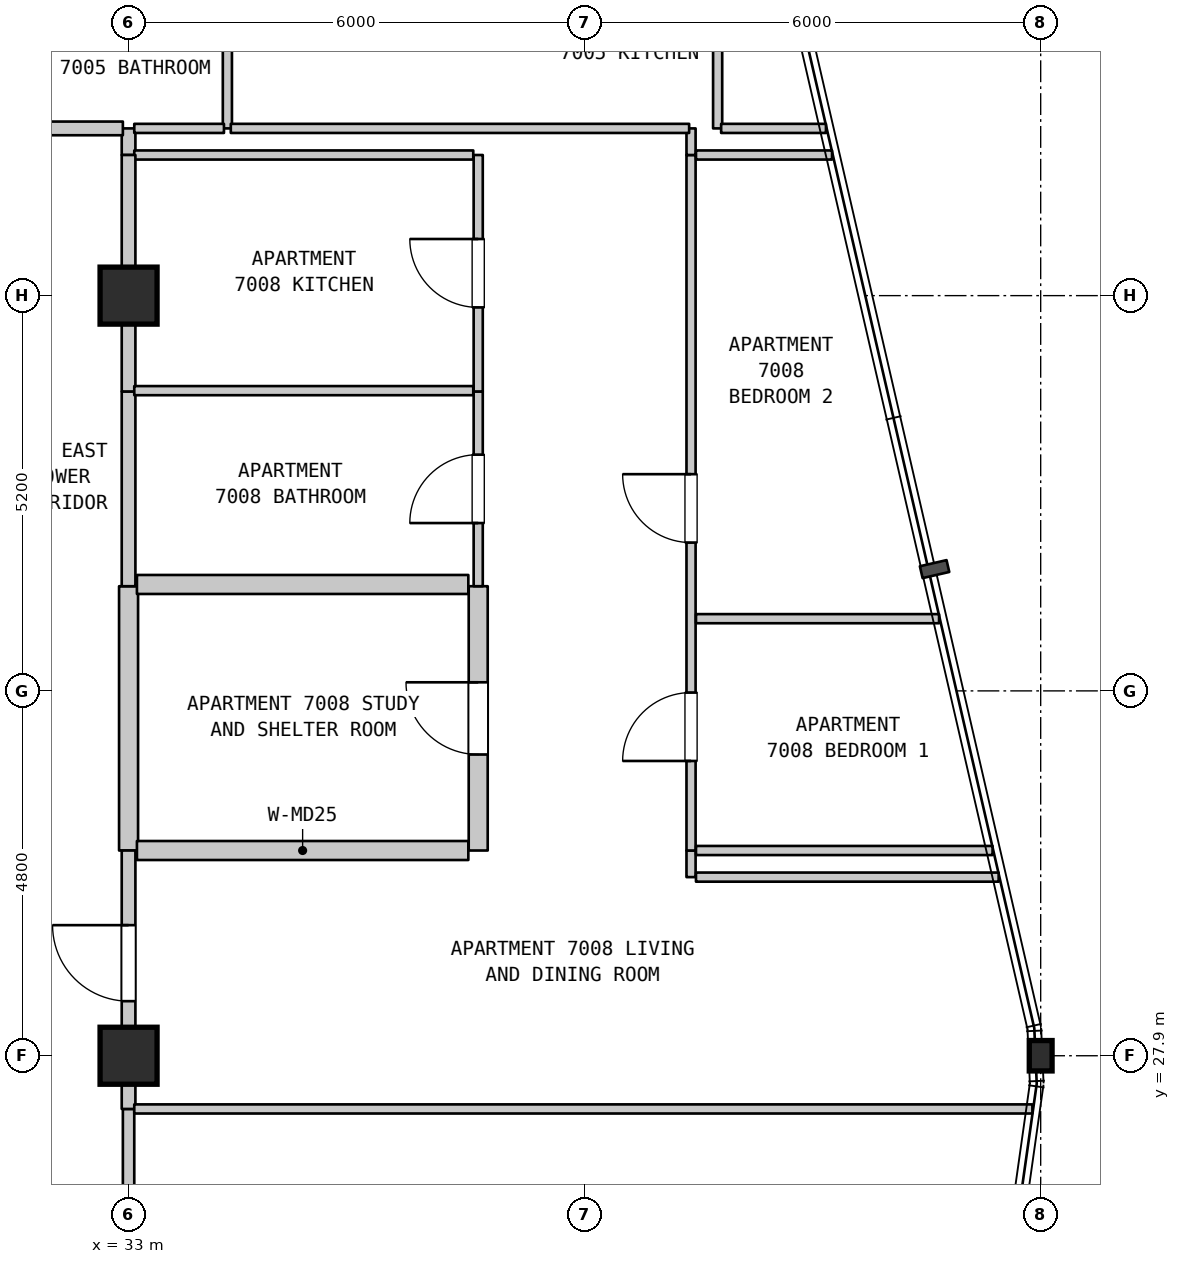
"""IFC4 building model, lengths in metres.
Left out: names, types, materials, properties, quantities, classifications, styles, units other than length and angle.
Written with IfcOpenShell. Run it as: python <this file> out.ifc"""

import sys

from ifc_helpers import new_model, si_unit, direction, frame, frame_2d, origin, origin_2d, place, context, subcontext, project, spatial, rectangle, i_section, extrude, element, fill, save


model = new_model("IFC4")
c1 = context("Model", 3, precision=1e-05, world=origin(), true_north=direction((0.0, 1.0)))
c2 = subcontext(c1, "Body", "Model", "MODEL_VIEW")
j1 = project(units=[si_unit("LENGTHUNIT", "METRE"), si_unit("PLANEANGLEUNIT", "RADIAN")], contexts=[c1])
p1 = place(None, origin())
s1 = spatial("IfcSite", under=j1, at=p1, CompositionType="ELEMENT")
p2 = place(p1, origin())
s2 = spatial("IfcBuilding", under=s1, at=p2, CompositionType="ELEMENT")
p3 = place(p2, frame((0.0, 0.0, 280.6)))
s3 = spatial("IfcBuildingStorey", under=s2, at=p3, CompositionType="ELEMENT", Elevation=280.6)
for number, where, z_axis, x_axis in (
    (1, (33.0, 27.9, 0.0), (0.0, 0.0, 1.0), (1.0, 0.0, 0.0)),
    (2, (33.0, 37.9, 0.0), (0.0, 0.0, 1.0), (1.0, 0.0, 0.0)),
):
    element("IfcColumn", number, at=place(p3, frame(where, z_axis=z_axis, x_axis=x_axis)), inside=s3, PredefinedType="COLUMN", context=c2, shape_type="SweptSolid", body=[
        extrude(rectangle(XDim=0.75, YDim=0.75, at=origin_2d()), origin(), (0.0, 0.0, 1.0), 3.7),
    ])
p4 = place(p3, frame((45.0, 27.9, 0.0), z_axis=(0.0, 0.0, 1.0), x_axis=(1.0, 0.0, 0.0)))
e3 = element("IfcColumn", 3, at=p4, inside=s3, PredefinedType="COLUMN", context=c2, shape_type="SweptSolid", body=[
    extrude(i_section(OverallWidth=0.3, OverallDepth=0.4, WebThickness=0.013, FlangeThickness=0.024, FilletRadius=0.027, at=origin_2d()), origin(), (0.0, 0.0, 1.0), 3.7),
])
p5 = place(p3, frame((33.0, 19.5, 0.0), z_axis=(0.0, 0.0, 1.0), x_axis=(0.0, 1.0, 0.0)))
e4 = element("IfcWall", 4, at=p5, inside=s3, PredefinedType="STANDARD", context=c2, shape_type="SweptSolid", body=[
    extrude(rectangle(XDim=7.7, YDim=0.15, at=frame_2d((3.85, 0.0))), origin(), (0.0, 0.0, 1.0), 3.1),
])
p6 = place(p5, frame((3.913, 0.0, 0.0)))
e5 = element("IfcOpeningElement", 5, at=p6, cuts=e4, PredefinedType="OPENING", context=c2, shape_type="SweptSolid", body=[
    extrude(rectangle(XDim=1.0, YDim=2.15, at=frame_2d((0.5, 1.075))), frame((0.0, 0.085, 0.0), z_axis=(0.0, -1.0, 0.0), x_axis=(1.0, 0.0, 0.0)), (0.0, 0.0, 1.0), 0.17),
])
p7 = place(p3, frame((33.0, 27.2, 0.0), z_axis=(0.0, 0.0, 1.0), x_axis=(0.0, 1.0, 0.0)))
e6 = element("IfcWall", 6, at=p7, inside=s3, PredefinedType="STANDARD", context=c2, shape_type="SweptSolid", body=[
    extrude(rectangle(XDim=0.7, YDim=0.18, at=frame_2d((0.35, 0.0))), origin(), (0.0, 0.0, 1.0), 3.1),
])
p8 = place(p3, frame((33.0, 30.6, 0.0), z_axis=(0.0, 0.0, 1.0), x_axis=(0.0, 1.0, 0.0)))
e7 = element("IfcWall", 7, at=p8, inside=s3, PredefinedType="STANDARD", context=c2, shape_type="SweptSolid", body=[
    extrude(rectangle(XDim=3.477, YDim=0.25, at=frame_2d((1.738, 0.0))), origin(), (0.0, 0.0, 1.0), 2.89),
])
p9 = place(p3, frame((33.0, 34.077, 0.0), z_axis=(0.0, 0.0, 1.0), x_axis=(0.0, 1.0, 0.0)))
e8 = element("IfcWall", 8, at=p9, inside=s3, PredefinedType="STANDARD", context=c2, shape_type="SweptSolid", body=[
    extrude(rectangle(XDim=2.562, YDim=0.18, at=frame_2d((1.281, 0.0))), origin(), (0.0, 0.0, 1.0), 2.89),
])
p10 = place(p3, frame((33.0, 36.639, 0.0), z_axis=(0.0, 0.0, 1.0), x_axis=(0.0, 1.0, 0.0)))
e9 = element("IfcWall", 9, at=p10, inside=s3, PredefinedType="STANDARD", context=c2, shape_type="SweptSolid", body=[
    extrude(rectangle(XDim=1.261, YDim=0.18, at=frame_2d((0.63, 0.0))), origin(), (0.0, 0.0, 1.0), 2.89),
])
p11 = place(p3, frame((33.0, 39.75, 0.0), z_axis=(0.0, 0.0, 1.0), x_axis=(0.0, 1.0, 0.0)))
e10 = element("IfcWall", 10, at=p11, inside=s3, PredefinedType="STANDARD", context=c2, shape_type="SweptSolid", body=[
    extrude(rectangle(XDim=0.35, YDim=0.18, at=frame_2d((0.175, 0.0))), origin(), (0.0, 0.0, 1.0), 3.39),
])
p12 = place(p3, frame((34.3, 40.1, 0.0), z_axis=(0.0, 0.0, 1.0), x_axis=(0.0, 1.0, 0.0)))
e11 = element("IfcWall", 11, at=p12, inside=s3, PredefinedType="PARTITIONING", context=c2, shape_type="SweptSolid", body=[
    extrude(rectangle(XDim=2.3, YDim=0.12, at=frame_2d((1.15, 0.0))), origin(), (0.0, 0.0, 1.0), 3.39),
])
p13 = place(p3, frame((37.6, 30.6, 0.0), z_axis=(0.0, 0.0, 1.0), x_axis=(0.0, 1.0, 0.0)))
e12 = element("IfcWall", 12, at=p13, inside=s3, PredefinedType="STANDARD", context=c2, shape_type="SweptSolid", body=[
    extrude(rectangle(XDim=3.477, YDim=0.25, at=frame_2d((1.738, 0.0))), origin(), (0.0, 0.0, 1.0), 3.39),
])
p14 = place(p13, frame((1.263, 0.0, 0.0)))
e13 = element("IfcOpeningElement", 13, at=p14, cuts=e12, PredefinedType="OPENING", context=c2, shape_type="SweptSolid", body=[
    extrude(rectangle(XDim=0.95, YDim=2.15, at=frame_2d((0.475, 1.075))), frame((0.0, 0.135, 0.0), z_axis=(0.0, -1.0, 0.0), x_axis=(1.0, 0.0, 0.0)), (0.0, 0.0, 1.0), 0.27),
])
p15 = place(p3, frame((37.6, 34.077, 0.0), z_axis=(0.0, 0.0, 1.0), x_axis=(0.0, 1.0, 0.0)))
e14 = element("IfcWall", 14, at=p15, inside=s3, PredefinedType="PARTITIONING", context=c2, shape_type="SweptSolid", body=[
    extrude(rectangle(XDim=2.562, YDim=0.12, at=frame_2d((1.281, 0.0))), origin(), (0.0, 0.0, 1.0), 3.39),
])
p16 = place(p15, frame((0.831, 0.0, 0.0)))
e15 = element("IfcOpeningElement", 15, at=p16, cuts=e14, PredefinedType="OPENING", context=c2, shape_type="SweptSolid", body=[
    extrude(rectangle(XDim=0.9, YDim=2.1, at=frame_2d((0.45, 1.05))), frame((0.0, 0.07, 0.0), z_axis=(0.0, -1.0, 0.0), x_axis=(1.0, 0.0, 0.0)), (0.0, 0.0, 1.0), 0.14),
])
p17 = place(p3, frame((37.6, 36.639, 0.0), z_axis=(0.0, 0.0, 1.0), x_axis=(0.0, 1.0, 0.0)))
e16 = element("IfcWall", 16, at=p17, inside=s3, PredefinedType="PARTITIONING", context=c2, shape_type="SweptSolid", body=[
    extrude(rectangle(XDim=3.111, YDim=0.12, at=frame_2d((1.556, 0.0))), origin(), (0.0, 0.0, 1.0), 3.39),
])
p18 = place(p17, frame((1.106, 0.0, 0.0)))
e17 = element("IfcOpeningElement", 17, at=p18, cuts=e16, PredefinedType="OPENING", context=c2, shape_type="SweptSolid", body=[
    extrude(rectangle(XDim=0.9, YDim=2.15, at=frame_2d((0.45, 1.075))), frame((0.0, 0.07, 0.0), z_axis=(0.0, -1.0, 0.0), x_axis=(1.0, 0.0, 0.0)), (0.0, 0.0, 1.0), 0.14),
])
p19 = place(p3, frame((40.4, 30.25, 0.0), z_axis=(0.0, 0.0, 1.0), x_axis=(0.0, 1.0, 0.0)))
e18 = element("IfcWall", 18, at=p19, inside=s3, PredefinedType="PARTITIONING", context=c2, shape_type="SweptSolid", body=[
    extrude(rectangle(XDim=0.35, YDim=0.12, at=frame_2d((0.175, 0.0))), origin(), (0.0, 0.0, 1.0), 3.39),
])
p20 = place(p3, frame((40.4, 30.6, 0.0), z_axis=(0.0, 0.0, 1.0), x_axis=(0.0, 1.0, 0.0)))
e19 = element("IfcWall", 19, at=p20, inside=s3, PredefinedType="PARTITIONING", context=c2, shape_type="SweptSolid", body=[
    extrude(rectangle(XDim=9.15, YDim=0.12, at=frame_2d((4.575, 0.0))), origin(), (0.0, 0.0, 1.0), 3.39),
])
p21 = place(p20, frame((1.178, 0.0, 0.0)))
e20 = element("IfcOpeningElement", 20, at=p21, cuts=e19, PredefinedType="OPENING", context=c2, shape_type="SweptSolid", body=[
    extrude(rectangle(XDim=0.9, YDim=2.15, at=frame_2d((0.45, 1.075))), frame((0.0, 0.07, 0.0), z_axis=(0.0, -1.0, 0.0), x_axis=(1.0, 0.0, 0.0)), (0.0, 0.0, 1.0), 0.14),
])
p22 = place(p20, frame((4.051, 0.0, 0.0)))
e21 = element("IfcOpeningElement", 21, at=p22, cuts=e19, PredefinedType="OPENING", context=c2, shape_type="SweptSolid", body=[
    extrude(rectangle(XDim=0.9, YDim=2.15, at=frame_2d((0.45, 1.075))), frame((0.0, 0.07, 0.0), z_axis=(0.0, -1.0, 0.0), x_axis=(1.0, 0.0, 0.0)), (0.0, 0.0, 1.0), 0.14),
])
p23 = place(p3, frame((40.4, 39.75, 0.0), z_axis=(0.0, 0.0, 1.0), x_axis=(0.0, 1.0, 0.0)))
e22 = element("IfcWall", 22, at=p23, inside=s3, PredefinedType="PARTITIONING", context=c2, shape_type="SweptSolid", body=[
    extrude(rectangle(XDim=0.35, YDim=0.12, at=frame_2d((0.175, 0.0))), origin(), (0.0, 0.0, 1.0), 3.39),
])
p24 = place(p3, frame((40.75, 40.1, 0.0), z_axis=(0.0, 0.0, 1.0), x_axis=(0.0, 1.0, 0.0)))
e23 = element("IfcWall", 23, at=p24, inside=s3, PredefinedType="PARTITIONING", context=c2, shape_type="SweptSolid", body=[
    extrude(rectangle(XDim=2.3, YDim=0.12, at=frame_2d((1.15, 0.0))), origin(), (0.0, 0.0, 1.0), 3.39),
])
p25 = place(p3, frame((33.075, 27.2, 0.0), z_axis=(0.0, 0.0, 1.0), x_axis=(1.0, 0.0, 0.0)))
e24 = element("IfcWall", 24, at=p25, inside=s3, PredefinedType="PARTITIONING", context=c2, shape_type="SweptSolid", body=[
    extrude(rectangle(XDim=11.816, YDim=0.12, at=frame_2d((5.908, 0.0))), origin(), (0.0, 0.0, 1.0), 3.39),
])
p26 = place(p3, frame((40.465, 30.25, 0.0), z_axis=(0.0, 0.0, 1.0), x_axis=(1.0, 0.0, 0.0)))
e25 = element("IfcWall", 25, at=p26, inside=s3, PredefinedType="PARTITIONING", context=c2, shape_type="SweptSolid", body=[
    extrude(rectangle(XDim=3.982, YDim=0.12, at=frame_2d((1.991, 0.0))), origin(), (0.0, 0.0, 1.0), 3.39),
])
p27 = place(p3, frame((33.11, 30.6, 0.0), z_axis=(0.0, 0.0, 1.0), x_axis=(1.0, 0.0, 0.0)))
e26 = element("IfcWall", 26, at=p27, inside=s3, PredefinedType="STANDARD", context=c2, shape_type="SweptSolid", body=[
    extrude(rectangle(XDim=4.36, YDim=0.25, at=frame_2d((2.18, 0.0))), origin(), (0.0, 0.0, 1.0), 3.39),
])
p28 = place(p3, frame((40.465, 30.6, 0.0), z_axis=(0.0, 0.0, 1.0), x_axis=(1.0, 0.0, 0.0)))
e27 = element("IfcWall", 27, at=p28, inside=s3, PredefinedType="PARTITIONING", context=c2, shape_type="SweptSolid", body=[
    extrude(rectangle(XDim=3.902, YDim=0.12, at=frame_2d((1.951, 0.0))), origin(), (0.0, 0.0, 1.0), 3.39),
])
p29 = place(p3, frame((40.465, 33.65, 0.0), z_axis=(0.0, 0.0, 1.0), x_axis=(1.0, 0.0, 0.0)))
e28 = element("IfcWall", 28, at=p29, inside=s3, PredefinedType="PARTITIONING", context=c2, shape_type="SweptSolid", body=[
    extrude(rectangle(XDim=3.198, YDim=0.12, at=frame_2d((1.599, 0.0))), origin(), (0.0, 0.0, 1.0), 3.39),
])
p30 = place(p3, frame((33.11, 34.1, 0.0), z_axis=(0.0, 0.0, 1.0), x_axis=(1.0, 0.0, 0.0)))
e29 = element("IfcWall", 29, at=p30, inside=s3, PredefinedType="STANDARD", context=c2, shape_type="SweptSolid", body=[
    extrude(rectangle(XDim=4.36, YDim=0.25, at=frame_2d((2.18, 0.0))), origin(), (0.0, 0.0, 1.0), 3.39),
])
for number, where, z_axis, x_axis in (
    (30, (33.075, 36.65, 0.0), (0.0, 0.0, 1.0), (1.0, 0.0, 0.0)),
    (31, (33.075, 39.75, 0.0), (0.0, 0.0, 1.0), (1.0, 0.0, 0.0)),
):
    element("IfcWall", number, at=place(p3, frame(where, z_axis=z_axis, x_axis=x_axis)), inside=s3, PredefinedType="PARTITIONING", context=c2, shape_type="SweptSolid", body=[
        extrude(rectangle(XDim=4.46, YDim=0.12, at=frame_2d((2.23, 0.0))), origin(), (0.0, 0.0, 1.0), 3.39),
    ])
p31 = place(p3, frame((40.465, 39.75, 0.0), z_axis=(0.0, 0.0, 1.0), x_axis=(1.0, 0.0, 0.0)))
e32 = element("IfcWall", 32, at=p31, inside=s3, PredefinedType="PARTITIONING", context=c2, shape_type="SweptSolid", body=[
    extrude(rectangle(XDim=1.79, YDim=0.12, at=frame_2d((0.895, 0.0))), origin(), (0.0, 0.0, 1.0), 3.39),
])
p32 = place(p3, frame((30.21, 40.1, 0.0), z_axis=(0.0, 0.0, 1.0), x_axis=(1.0, 0.0, 0.0)))
e33 = element("IfcWall", 33, at=p32, inside=s3, PredefinedType="STANDARD", context=c2, shape_type="SweptSolid", body=[
    extrude(rectangle(XDim=2.715, YDim=0.18, at=frame_2d((1.357, 0.0))), origin(), (0.0, 0.0, 1.0), 3.39),
])
p33 = place(p3, frame((33.075, 40.1, 0.0), z_axis=(0.0, 0.0, 1.0), x_axis=(1.0, 0.0, 0.0)))
e34 = element("IfcWall", 34, at=p33, inside=s3, PredefinedType="PARTITIONING", context=c2, shape_type="SweptSolid", body=[
    extrude(rectangle(XDim=1.18, YDim=0.12, at=frame_2d((0.59, 0.0))), origin(), (0.0, 0.0, 1.0), 3.39),
])
p34 = place(p3, frame((34.345, 40.1, 0.0), z_axis=(0.0, 0.0, 1.0), x_axis=(1.0, 0.0, 0.0)))
e35 = element("IfcWall", 35, at=p34, inside=s3, PredefinedType="PARTITIONING", context=c2, shape_type="SweptSolid", body=[
    extrude(rectangle(XDim=6.03, YDim=0.12, at=frame_2d((3.015, 0.0))), origin(), (0.0, 0.0, 1.0), 3.39),
])
p35 = place(p3, frame((40.796, 40.1, 0.0), z_axis=(0.0, 0.0, 1.0), x_axis=(1.0, 0.0, 0.0)))
e36 = element("IfcWall", 36, at=p35, inside=s3, PredefinedType="PARTITIONING", context=c2, shape_type="SweptSolid", body=[
    extrude(rectangle(XDim=1.379, YDim=0.12, at=frame_2d((0.689, 0.0))), origin(), (0.0, 0.0, 1.0), 3.39),
])
p36 = place(p3, frame((33.0, 27.9, 0.0), z_axis=(0.0, 0.0, 1.0), x_axis=(0.0, 1.0, 0.0)))
e37 = element("IfcWall", 37, at=p36, inside=s3, PredefinedType="STANDARD", context=c2, shape_type="SweptSolid", body=[
    extrude(rectangle(XDim=2.7, YDim=0.18, at=frame_2d((1.35, 0.0))), origin(), (0.0, 0.0, 1.0), 2.89),
])
p37 = place(p36, frame((0.718, 0.0, 0.0)))
e38 = element("IfcOpeningElement", 38, at=p37, cuts=e37, PredefinedType="OPENING", context=c2, shape_type="SweptSolid", body=[
    extrude(rectangle(XDim=1.0, YDim=2.15, at=frame_2d((0.5, 1.075))), frame((0.0, 0.1, 0.0), z_axis=(0.0, -1.0, 0.0), x_axis=(1.0, 0.0, 0.0)), (0.0, 0.0, 1.0), 0.2),
])
p38 = place(p3, frame((33.0, 37.9, 0.0), z_axis=(0.0, 0.0, 1.0), x_axis=(0.0, 1.0, 0.0)))
e39 = element("IfcWall", 39, at=p38, inside=s3, PredefinedType="STANDARD", context=c2, shape_type="SweptSolid", body=[
    extrude(rectangle(XDim=1.85, YDim=0.18, at=frame_2d((0.925, 0.0))), origin(), (0.0, 0.0, 1.0), 2.79),
])
p39 = place(p37, origin())
e40 = element("IfcDoor", 40, at=p39, inside=s3, OperationType="SINGLE_SWING_RIGHT", PredefinedType="DOOR", context=c2, shape_type="SweptSolid", body=[
    extrude(rectangle(XDim=1.0, YDim=2.15, at=frame_2d((0.5, 1.075))), frame((0.0, 0.025, 0.0), z_axis=(0.0, -1.0, 0.0), x_axis=(1.0, 0.0, 0.0)), (0.0, 0.0, 1.0), 0.05),
])
fill(e38, e40)
p40 = place(p14, origin())
e41 = element("IfcDoor", 41, at=p40, inside=s3, OperationType="SINGLE_SWING_RIGHT", PredefinedType="DOOR", context=c2, shape_type="SweptSolid", body=[
    extrude(rectangle(XDim=0.95, YDim=2.15, at=frame_2d((0.475, 1.075))), frame((0.0, 0.025, 0.0), z_axis=(0.0, -1.0, 0.0), x_axis=(1.0, 0.0, 0.0)), (0.0, 0.0, 1.0), 0.05),
])
fill(e13, e41)
p41 = place(p16, origin())
e42 = element("IfcDoor", 42, at=p41, inside=s3, OperationType="SINGLE_SWING_LEFT", PredefinedType="DOOR", context=c2, shape_type="SweptSolid", body=[
    extrude(rectangle(XDim=0.9, YDim=2.1, at=frame_2d((0.45, 1.05))), frame((0.0, 0.025, 0.0), z_axis=(0.0, -1.0, 0.0), x_axis=(1.0, 0.0, 0.0)), (0.0, 0.0, 1.0), 0.05),
])
fill(e15, e42)
p42 = place(p18, origin())
e43 = element("IfcDoor", 43, at=p42, inside=s3, OperationType="SINGLE_SWING_RIGHT", PredefinedType="DOOR", context=c2, shape_type="SweptSolid", body=[
    extrude(rectangle(XDim=0.9, YDim=2.15, at=frame_2d((0.45, 1.075))), frame((0.0, 0.025, 0.0), z_axis=(0.0, -1.0, 0.0), x_axis=(1.0, 0.0, 0.0)), (0.0, 0.0, 1.0), 0.05),
])
fill(e17, e43)
p43 = place(p21, origin())
e44 = element("IfcDoor", 44, at=p43, inside=s3, OperationType="SINGLE_SWING_LEFT", PredefinedType="DOOR", context=c2, shape_type="SweptSolid", body=[
    extrude(rectangle(XDim=0.9, YDim=2.15, at=frame_2d((0.45, 1.075))), frame((0.0, 0.025, 0.0), z_axis=(0.0, -1.0, 0.0), x_axis=(1.0, 0.0, 0.0)), (0.0, 0.0, 1.0), 0.05),
])
fill(e20, e44)
p44 = place(p22, origin())
e45 = element("IfcDoor", 45, at=p44, inside=s3, OperationType="SINGLE_SWING_RIGHT", PredefinedType="DOOR", context=c2, shape_type="SweptSolid", body=[
    extrude(rectangle(XDim=0.9, YDim=2.15, at=frame_2d((0.45, 1.075))), frame((0.0, 0.025, 0.0), z_axis=(0.0, -1.0, 0.0), x_axis=(1.0, 0.0, 0.0)), (0.0, 0.0, 1.0), 0.05),
])
fill(e21, e45)
save(model, sys.argv[1])
